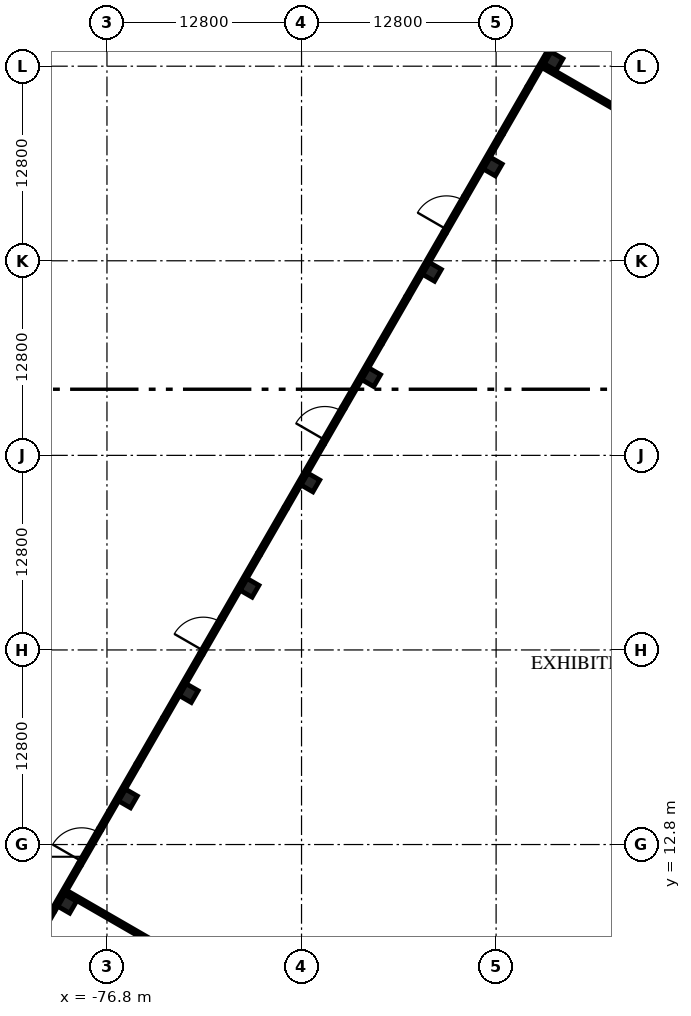
"""IFC4 building model, lengths in metres.
Left out: names, types, materials, properties, quantities, classifications, styles, units other than length and angle.
Written with IfcOpenShell. Run it as: python <this file> out.ifc"""

import sys

from ifc_helpers import new_model, si_unit, direction, frame, frame_2d, origin, origin_2d, place, context, subcontext, project, spatial, rectangle, extrude, element, fill, save


model = new_model("IFC4")
c1 = context("Model", 3, precision=1e-05, world=origin(), true_north=direction((0.0, 1.0)))
c2 = subcontext(c1, "Body", "Model", "MODEL_VIEW")
j1 = project(units=[si_unit("LENGTHUNIT", "METRE"), si_unit("PLANEANGLEUNIT", "RADIAN")], contexts=[c1])
p1 = place(None, origin())
s1 = spatial("IfcSite", under=j1, at=p1, CompositionType="ELEMENT")
p2 = place(p1, origin())
s2 = spatial("IfcBuilding", under=s1, at=p2, CompositionType="ELEMENT")
p3 = place(p2, origin())
s3 = spatial("IfcBuildingStorey", under=s2, at=p3, CompositionType="ELEMENT", Elevation=0.0)
for number, where, z_axis, x_axis in (
    (1, (-47.417, 64.327, -0.3), (0.0, 0.0, 1.0), (-0.5, -0.866, 0.0)),
    (2, (-51.417, 57.399, -0.3), (0.0, 0.0, 1.0), (-0.5, -0.866, 0.0)),
    (3, (-55.417, 50.47, -0.3), (0.0, 0.0, 1.0), (-0.5, -0.866, 0.0)),
    (4, (-59.417, 43.542, -0.3), (0.0, 0.0, 1.0), (-0.5, -0.866, 0.0)),
    (5, (-63.417, 36.614, -0.3), (0.0, 0.0, 1.0), (-0.5, -0.866, 0.0)),
    (6, (-67.417, 29.686, -0.3), (0.0, 0.0, 1.0), (-0.5, -0.866, 0.0)),
    (7, (-71.417, 22.758, -0.3), (0.0, 0.0, 1.0), (-0.5, -0.866, 0.0)),
    (8, (-75.417, 15.829, -0.3), (0.0, 0.0, 1.0), (-0.5, -0.866, 0.0)),
    (9, (-79.417, 8.901, -0.3), (0.0, 0.0, 1.0), (-0.5, -0.866, 0.0)),
):
    element("IfcColumn", number, at=place(p3, frame(where, z_axis=z_axis, x_axis=x_axis)), inside=s3, PredefinedType="COLUMN", context=c2, shape_type="SweptSolid", body=[
        extrude(rectangle(XDim=0.9, YDim=0.9, at=origin_2d()), origin(), (0.0, 0.0, 1.0), 6.3),
    ])
p4 = place(p3, frame((-49.071, 62.612, 0.0), z_axis=(0.0, 0.0, 1.0), x_axis=(0.500025443912, 0.866010713236, 0.0)))
e10 = element("IfcWall", 10, at=p4, inside=s3, PredefinedType="SOLIDWALL", context=c2, shape_type="SweptSolid", body=[
    extrude(rectangle(XDim=3.162, YDim=0.25, at=frame_2d((1.581, 0.0))), origin(), (0.0, 0.0, 1.0), 5.7),
])
p5 = place(p3, frame((-50.821, 59.581, 0.0), z_axis=(0.0, 0.0, 1.0), x_axis=(0.500010275428, 0.866019471182, 0.0)))
e11 = element("IfcWall", 11, at=p5, inside=s3, PredefinedType="SOLIDWALL", context=c2, shape_type="SweptSolid", body=[
    extrude(rectangle(XDim=3.5, YDim=0.25, at=frame_2d((1.75, 0.0))), origin(), (0.0, 0.0, 1.0), 5.7),
])
p6 = place(p5, frame((0.25, 0.0, 3.2)))
e12 = element("IfcOpeningElement", 12, at=p6, cuts=e11, PredefinedType="OPENING", context=c2, shape_type="SweptSolid", body=[
    extrude(rectangle(XDim=3.0, YDim=2.0, at=frame_2d((1.5, 1.0))), frame((0.0, 0.135, 0.0), z_axis=(0.0, -1.0, 0.0), x_axis=(1.0, 0.0, 0.0)), (0.0, 0.0, 1.0), 0.27),
])
p7 = place(p3, frame((-53.24, 55.391, 0.0), z_axis=(0.0, 0.0, 1.0), x_axis=(0.499981632079, 0.866036008249, 0.0)))
e13 = element("IfcWall", 13, at=p7, inside=s3, PredefinedType="SOLIDWALL", context=c2, shape_type="SweptSolid", body=[
    extrude(rectangle(XDim=4.838, YDim=0.25, at=frame_2d((2.419, 0.0))), origin(), (0.0, 0.0, 1.0), 5.7),
])
p8 = place(p3, frame((-54.59, 53.053, 0.0), z_axis=(0.0, 0.0, 1.0), x_axis=(0.500048589285, 0.86599734893, 0.0)))
e14 = element("IfcWall", 14, at=p8, inside=s3, PredefinedType="SOLIDWALL", context=c2, shape_type="SweptSolid", body=[
    extrude(rectangle(XDim=2.7, YDim=0.25, at=frame_2d((1.35, 0.0))), origin(), (0.0, 0.0, 1.0), 5.7),
])
p9 = place(p8, frame((0.25, 0.0, 0.0)))
e15 = element("IfcOpeningElement", 15, at=p9, cuts=e14, PredefinedType="OPENING", context=c2, shape_type="SweptSolid", body=[
    extrude(rectangle(XDim=2.2, YDim=2.1, at=frame_2d((1.1, 1.05))), frame((0.0, 0.135, 0.0), z_axis=(0.0, -1.0, 0.0), x_axis=(1.0, 0.0, 0.0)), (0.0, 0.0, 1.0), 0.27),
])
p10 = place(p3, frame((-57.04, 48.809, 0.0), z_axis=(0.0, 0.0, 1.0), x_axis=(0.49998122708, 0.866036242063, 0.0)))
e16 = element("IfcWall", 16, at=p10, inside=s3, PredefinedType="SOLIDWALL", context=c2, shape_type="SweptSolid", body=[
    extrude(rectangle(XDim=4.9, YDim=0.25, at=frame_2d((2.45, 0.0))), origin(), (0.0, 0.0, 1.0), 5.7),
])
p11 = place(p3, frame((-58.79, 45.778, 0.0), z_axis=(0.0, 0.0, 1.0), x_axis=(0.500010275428, 0.866019471182, 0.0)))
e17 = element("IfcWall", 17, at=p11, inside=s3, PredefinedType="SOLIDWALL", context=c2, shape_type="SweptSolid", body=[
    extrude(rectangle(XDim=3.5, YDim=0.25, at=frame_2d((1.75, 0.0))), origin(), (0.0, 0.0, 1.0), 5.7),
])
p12 = place(p11, frame((0.25, 0.0, 3.2)))
e18 = element("IfcOpeningElement", 18, at=p12, cuts=e17, PredefinedType="OPENING", context=c2, shape_type="SweptSolid", body=[
    extrude(rectangle(XDim=3.0, YDim=2.0, at=frame_2d((1.5, 1.0))), frame((0.0, 0.135, 0.0), z_axis=(0.0, -1.0, 0.0), x_axis=(1.0, 0.0, 0.0)), (0.0, 0.0, 1.0), 0.27),
])
p13 = place(p3, frame((-61.24, 41.535, 0.0), z_axis=(0.0, 0.0, 1.0), x_axis=(0.49998122708, 0.866036242063, 0.0)))
e19 = element("IfcWall", 19, at=p13, inside=s3, PredefinedType="SOLIDWALL", context=c2, shape_type="SweptSolid", body=[
    extrude(rectangle(XDim=4.9, YDim=0.25, at=frame_2d((2.45, 0.0))), origin(), (0.0, 0.0, 1.0), 5.7),
])
p14 = place(p3, frame((-62.59, 39.197, 0.0), z_axis=(0.0, 0.0, 1.0), x_axis=(0.500048589285, 0.86599734893, 0.0)))
e20 = element("IfcWall", 20, at=p14, inside=s3, PredefinedType="SOLIDWALL", context=c2, shape_type="SweptSolid", body=[
    extrude(rectangle(XDim=2.7, YDim=0.25, at=frame_2d((1.35, 0.0))), origin(), (0.0, 0.0, 1.0), 5.7),
])
p15 = place(p14, frame((0.25, 0.0, 0.0)))
e21 = element("IfcOpeningElement", 21, at=p15, cuts=e20, PredefinedType="OPENING", context=c2, shape_type="SweptSolid", body=[
    extrude(rectangle(XDim=2.2, YDim=2.1, at=frame_2d((1.1, 1.05))), frame((0.0, 0.135, 0.0), z_axis=(0.0, -1.0, 0.0), x_axis=(1.0, 0.0, 0.0)), (0.0, 0.0, 1.0), 0.27),
])
p16 = place(p3, frame((-65.04, 34.953, 0.0), z_axis=(0.0, 0.0, 1.0), x_axis=(0.49998122708, 0.866036242063, 0.0)))
e22 = element("IfcWall", 22, at=p16, inside=s3, PredefinedType="SOLIDWALL", context=c2, shape_type="SweptSolid", body=[
    extrude(rectangle(XDim=4.9, YDim=0.25, at=frame_2d((2.45, 0.0))), origin(), (0.0, 0.0, 1.0), 5.7),
])
p17 = place(p3, frame((-66.79, 31.922, 0.0), z_axis=(0.0, 0.0, 1.0), x_axis=(0.500010275428, 0.866019471182, 0.0)))
e23 = element("IfcWall", 23, at=p17, inside=s3, PredefinedType="SOLIDWALL", context=c2, shape_type="SweptSolid", body=[
    extrude(rectangle(XDim=3.5, YDim=0.25, at=frame_2d((1.75, 0.0))), origin(), (0.0, 0.0, 1.0), 5.7),
])
p18 = place(p17, frame((0.25, 0.0, 3.2)))
e24 = element("IfcOpeningElement", 24, at=p18, cuts=e23, PredefinedType="OPENING", context=c2, shape_type="SweptSolid", body=[
    extrude(rectangle(XDim=3.0, YDim=2.0, at=frame_2d((1.5, 1.0))), frame((0.0, 0.135, 0.0), z_axis=(0.0, -1.0, 0.0), x_axis=(1.0, 0.0, 0.0)), (0.0, 0.0, 1.0), 0.27),
])
p19 = place(p3, frame((-69.24, 27.678, 0.0), z_axis=(0.0, 0.0, 1.0), x_axis=(0.49998122708, 0.866036242063, 0.0)))
e25 = element("IfcWall", 25, at=p19, inside=s3, PredefinedType="SOLIDWALL", context=c2, shape_type="SweptSolid", body=[
    extrude(rectangle(XDim=4.9, YDim=0.25, at=frame_2d((2.45, 0.0))), origin(), (0.0, 0.0, 1.0), 5.7),
])
p20 = place(p3, frame((-70.59, 25.34, 0.0), z_axis=(0.0, 0.0, 1.0), x_axis=(0.500048589285, 0.86599734893, 0.0)))
e26 = element("IfcWall", 26, at=p20, inside=s3, PredefinedType="SOLIDWALL", context=c2, shape_type="SweptSolid", body=[
    extrude(rectangle(XDim=2.7, YDim=0.25, at=frame_2d((1.35, 0.0))), origin(), (0.0, 0.0, 1.0), 5.7),
])
p21 = place(p20, frame((0.25, 0.0, 0.0)))
e27 = element("IfcOpeningElement", 27, at=p21, cuts=e26, PredefinedType="OPENING", context=c2, shape_type="SweptSolid", body=[
    extrude(rectangle(XDim=2.2, YDim=2.1, at=frame_2d((1.1, 1.05))), frame((0.0, 0.135, 0.0), z_axis=(0.0, -1.0, 0.0), x_axis=(1.0, 0.0, 0.0)), (0.0, 0.0, 1.0), 0.27),
])
p22 = place(p3, frame((-73.04, 21.096, 0.0), z_axis=(0.0, 0.0, 1.0), x_axis=(0.49998122708, 0.866036242063, 0.0)))
e28 = element("IfcWall", 28, at=p22, inside=s3, PredefinedType="SOLIDWALL", context=c2, shape_type="SweptSolid", body=[
    extrude(rectangle(XDim=4.9, YDim=0.25, at=frame_2d((2.45, 0.0))), origin(), (0.0, 0.0, 1.0), 5.7),
])
p23 = place(p3, frame((-74.79, 18.065, 0.0), z_axis=(0.0, 0.0, 1.0), x_axis=(0.500010275428, 0.866019471182, 0.0)))
e29 = element("IfcWall", 29, at=p23, inside=s3, PredefinedType="SOLIDWALL", context=c2, shape_type="SweptSolid", body=[
    extrude(rectangle(XDim=3.5, YDim=0.25, at=frame_2d((1.75, 0.0))), origin(), (0.0, 0.0, 1.0), 5.7),
])
p24 = place(p23, frame((0.25, 0.0, 3.2)))
e30 = element("IfcOpeningElement", 30, at=p24, cuts=e29, PredefinedType="OPENING", context=c2, shape_type="SweptSolid", body=[
    extrude(rectangle(XDim=3.0, YDim=2.0, at=frame_2d((1.5, 1.0))), frame((0.0, 0.135, 0.0), z_axis=(0.0, -1.0, 0.0), x_axis=(1.0, 0.0, 0.0)), (0.0, 0.0, 1.0), 0.27),
])
p25 = place(p3, frame((-77.24, 13.822, 0.0), z_axis=(0.0, 0.0, 1.0), x_axis=(0.500002801628, 0.866023786258, 0.0)))
e31 = element("IfcWall", 31, at=p25, inside=s3, PredefinedType="SOLIDWALL", context=c2, shape_type="SweptSolid", body=[
    extrude(rectangle(XDim=4.9, YDim=0.25, at=frame_2d((2.45, 0.0))), origin(), (0.0, 0.0, 1.0), 5.7),
])
p26 = place(p3, frame((-78.59, 11.484, 0.0), z_axis=(0.0, 0.0, 1.0), x_axis=(0.50000943426, 0.866019956843, 0.0)))
e32 = element("IfcWall", 32, at=p26, inside=s3, PredefinedType="SOLIDWALL", context=c2, shape_type="SweptSolid", body=[
    extrude(rectangle(XDim=2.7, YDim=0.25, at=frame_2d((1.35, 0.0))), origin(), (0.0, 0.0, 1.0), 5.7),
])
p27 = place(p26, frame((0.25, 0.0, 0.0)))
e33 = element("IfcOpeningElement", 33, at=p27, cuts=e32, PredefinedType="OPENING", context=c2, shape_type="SweptSolid", body=[
    extrude(rectangle(XDim=2.2, YDim=2.1, at=frame_2d((1.1, 1.05))), frame((0.0, 0.135, 0.0), z_axis=(0.0, -1.0, 0.0), x_axis=(1.0, 0.0, 0.0)), (0.0, 0.0, 1.0), 0.27),
])
p28 = place(p3, frame((-80.34, 8.452, 0.0), z_axis=(0.0, 0.0, 1.0), x_axis=(0.499980071345, 0.866036909293, 0.0)))
e34 = element("IfcWall", 34, at=p28, inside=s3, PredefinedType="SOLIDWALL", context=c2, shape_type="SweptSolid", body=[
    extrude(rectangle(XDim=3.5, YDim=0.25, at=frame_2d((1.75, 0.0))), origin(), (0.0, 0.0, 1.0), 5.7),
])
p29 = place(p3, frame((-81.49, 6.461, 0.0), z_axis=(0.0, 0.0, 1.0), x_axis=(0.499998129301, 0.86602648383, 0.0)))
e35 = element("IfcWall", 35, at=p29, inside=s3, PredefinedType="SOLIDWALL", context=c2, shape_type="SweptSolid", body=[
    extrude(rectangle(XDim=2.3, YDim=0.25, at=frame_2d((1.15, 0.0))), origin(), (0.0, 0.0, 1.0), 5.7),
])
p30 = place(p29, frame((0.25, 0.0, 0.0)))
e36 = element("IfcOpeningElement", 36, at=p30, cuts=e35, PredefinedType="OPENING", context=c2, shape_type="SweptSolid", body=[
    extrude(rectangle(XDim=1.8, YDim=2.1, at=frame_2d((0.9, 1.05))), frame((0.0, 0.135, 0.0), z_axis=(0.0, -1.0, 0.0), x_axis=(1.0, 0.0, 0.0)), (0.0, 0.0, 1.0), 0.27),
])
p31 = place(p3, frame((-37.034, 57.611, 0.0), z_axis=(0.0, 0.0, 1.0), x_axis=(-0.866025499775, 0.499999833739, 0.0)))
e37 = element("IfcWall", 37, at=p31, inside=s3, PredefinedType="SOLIDWALL", context=c2, shape_type="SweptSolid", body=[
    extrude(rectangle(XDim=12.8, YDim=0.25, at=frame_2d((6.4, 0.0))), origin(), (0.0, 0.0, 1.0), 5.1),
])
p32 = place(p3, frame((-68.409, 3.267, 0.0), z_axis=(0.0, 0.0, 1.0), x_axis=(-0.866017240552, 0.500014138866, 0.0)))
e38 = element("IfcWall", 38, at=p32, inside=s3, PredefinedType="SOLIDWALL", context=c2, shape_type="SweptSolid", body=[
    extrude(rectangle(XDim=12.8, YDim=0.25, at=frame_2d((6.4, 0.0))), origin(), (0.0, 0.0, 1.0), 5.1),
])
p33 = place(p6, origin())
e39 = element("IfcWindow", 39, at=p33, inside=s3, PartitioningType="SINGLE_PANEL", PredefinedType="WINDOW", context=c2, shape_type="SweptSolid", body=[
    extrude(rectangle(XDim=3.0, YDim=2.0, at=frame_2d((1.5, 1.0))), frame((0.0, 0.03, 0.0), z_axis=(0.0, -1.0, 0.0), x_axis=(1.0, 0.0, 0.0)), (0.0, 0.0, 1.0), 0.06),
])
fill(e12, e39)
p34 = place(p9, origin())
e40 = element("IfcDoor", 40, at=p34, inside=s3, OperationType="DOUBLE_DOOR_SINGLE_SWING", PredefinedType="DOOR", context=c2, shape_type="SweptSolid", body=[
    extrude(rectangle(XDim=2.2, YDim=2.1, at=frame_2d((1.1, 1.05))), frame((0.0, 0.025, 0.0), z_axis=(0.0, -1.0, 0.0), x_axis=(1.0, 0.0, 0.0)), (0.0, 0.0, 1.0), 0.05),
])
fill(e15, e40)
p35 = place(p12, origin())
e41 = element("IfcWindow", 41, at=p35, inside=s3, PartitioningType="SINGLE_PANEL", PredefinedType="WINDOW", context=c2, shape_type="SweptSolid", body=[
    extrude(rectangle(XDim=3.0, YDim=2.0, at=frame_2d((1.5, 1.0))), frame((0.0, 0.03, 0.0), z_axis=(0.0, -1.0, 0.0), x_axis=(1.0, 0.0, 0.0)), (0.0, 0.0, 1.0), 0.06),
])
fill(e18, e41)
p36 = place(p15, origin())
e42 = element("IfcDoor", 42, at=p36, inside=s3, OperationType="DOUBLE_DOOR_SINGLE_SWING", PredefinedType="DOOR", context=c2, shape_type="SweptSolid", body=[
    extrude(rectangle(XDim=2.2, YDim=2.1, at=frame_2d((1.1, 1.05))), frame((0.0, 0.025, 0.0), z_axis=(0.0, -1.0, 0.0), x_axis=(1.0, 0.0, 0.0)), (0.0, 0.0, 1.0), 0.05),
])
fill(e21, e42)
p37 = place(p18, origin())
e43 = element("IfcWindow", 43, at=p37, inside=s3, PartitioningType="SINGLE_PANEL", PredefinedType="WINDOW", context=c2, shape_type="SweptSolid", body=[
    extrude(rectangle(XDim=3.0, YDim=2.0, at=frame_2d((1.5, 1.0))), frame((0.0, 0.03, 0.0), z_axis=(0.0, -1.0, 0.0), x_axis=(1.0, 0.0, 0.0)), (0.0, 0.0, 1.0), 0.06),
])
fill(e24, e43)
p38 = place(p21, origin())
e44 = element("IfcDoor", 44, at=p38, inside=s3, OperationType="DOUBLE_DOOR_SINGLE_SWING", PredefinedType="DOOR", context=c2, shape_type="SweptSolid", body=[
    extrude(rectangle(XDim=2.2, YDim=2.1, at=frame_2d((1.1, 1.05))), frame((0.0, 0.025, 0.0), z_axis=(0.0, -1.0, 0.0), x_axis=(1.0, 0.0, 0.0)), (0.0, 0.0, 1.0), 0.05),
])
fill(e27, e44)
p39 = place(p24, origin())
e45 = element("IfcWindow", 45, at=p39, inside=s3, PartitioningType="SINGLE_PANEL", PredefinedType="WINDOW", context=c2, shape_type="SweptSolid", body=[
    extrude(rectangle(XDim=3.0, YDim=2.0, at=frame_2d((1.5, 1.0))), frame((0.0, 0.03, 0.0), z_axis=(0.0, -1.0, 0.0), x_axis=(1.0, 0.0, 0.0)), (0.0, 0.0, 1.0), 0.06),
])
fill(e30, e45)
p40 = place(p27, origin())
e46 = element("IfcDoor", 46, at=p40, inside=s3, OperationType="DOUBLE_DOOR_SINGLE_SWING", PredefinedType="DOOR", context=c2, shape_type="SweptSolid", body=[
    extrude(rectangle(XDim=2.2, YDim=2.1, at=frame_2d((1.1, 1.05))), frame((0.0, 0.025, 0.0), z_axis=(0.0, -1.0, 0.0), x_axis=(1.0, 0.0, 0.0)), (0.0, 0.0, 1.0), 0.05),
])
fill(e33, e46)
save(model, sys.argv[1])
